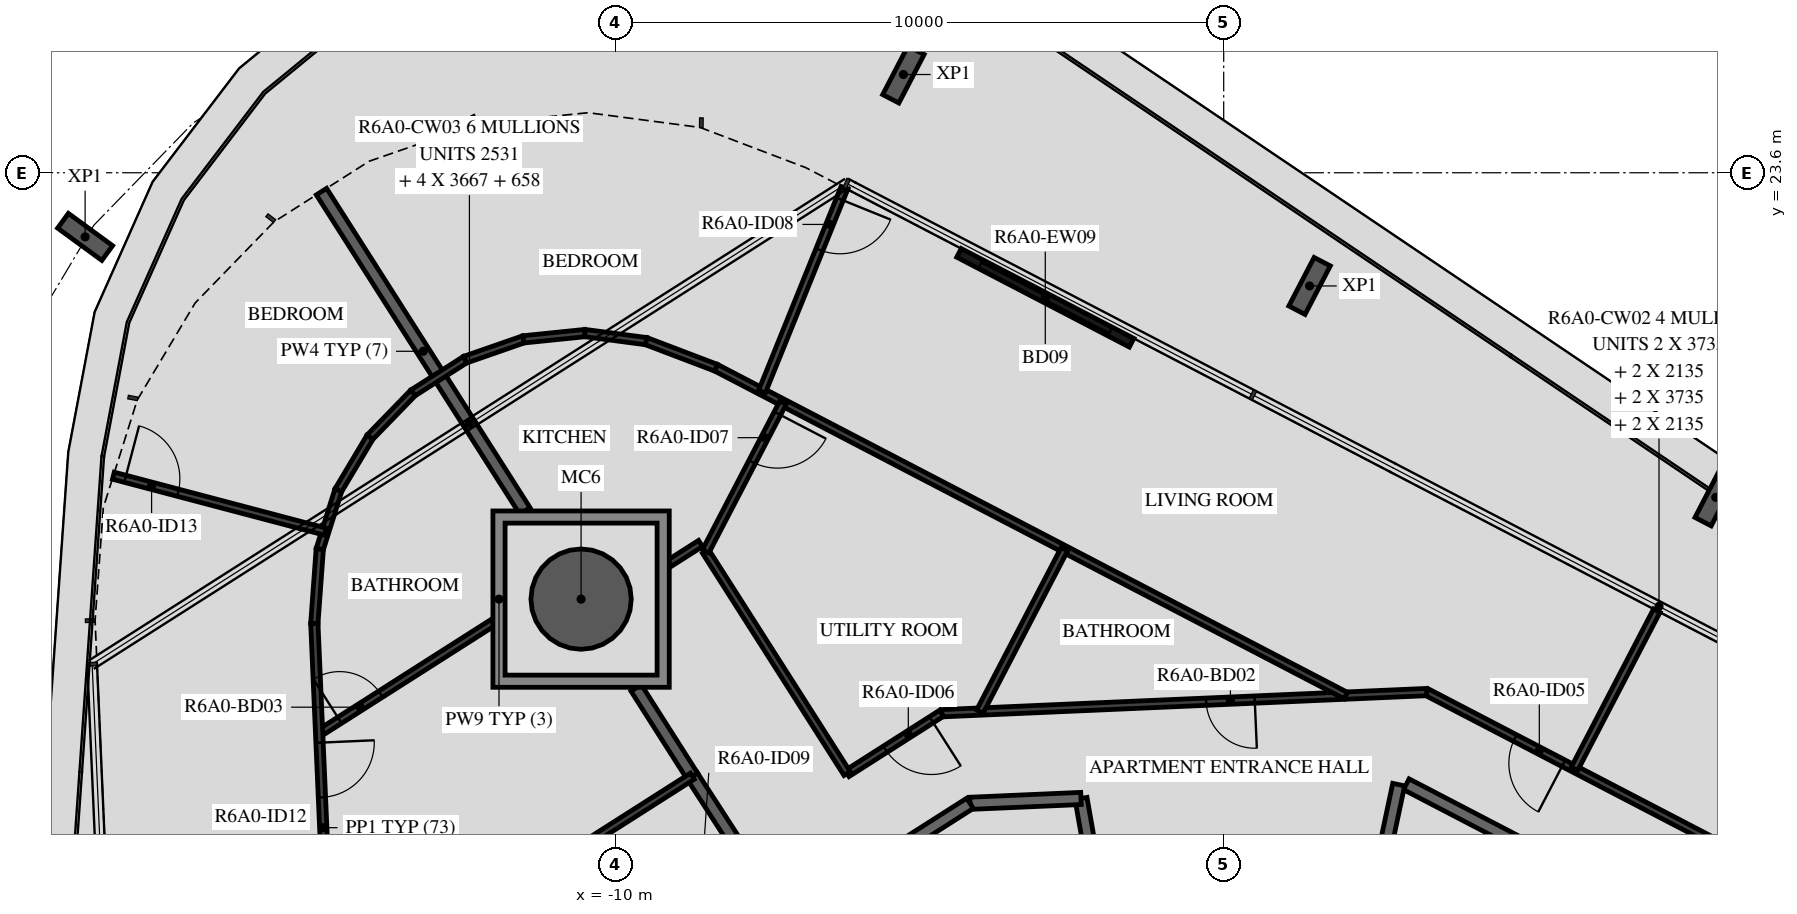
"""IFC4 building model, lengths in metres.
Left out: names, types, materials, properties, quantities, classifications, styles, units other than length and angle.
Written with IfcOpenShell. Run it as: python <this file> out.ifc"""

import sys

from ifc_helpers import new_model, si_unit, direction, frame, frame_2d, origin, origin_2d, place, context, subcontext, project, spatial, polyline, rectangle, hollow_circle, i_section, outline, extrude, element, fill, save


model = new_model("IFC4")
c1 = context("Model", 3, precision=1e-05, world=origin(), true_north=direction((0.0, 1.0)))
c2 = subcontext(c1, "Body", "Model", "MODEL_VIEW")
j1 = project(units=[si_unit("LENGTHUNIT", "METRE"), si_unit("PLANEANGLEUNIT", "RADIAN")], contexts=[c1])
p1 = place(None, origin())
s1 = spatial("IfcSite", under=j1, at=p1, CompositionType="ELEMENT")
p2 = place(p1, origin())
s2 = spatial("IfcBuilding", under=s1, at=p2, CompositionType="ELEMENT")
p3 = place(p2, frame((0.0, 0.0, 226.7)))
s3 = spatial("IfcBuildingStorey", under=s2, at=p3, CompositionType="ELEMENT", Elevation=226.7)
p4 = place(p3, frame((-10.568, 16.588, -0.45), z_axis=(0.0, 0.0, 1.0), x_axis=(1.0, 0.0, 0.0)))
e1 = element("IfcColumn", 1, at=p4, inside=s3, PredefinedType="COLUMN", context=c2, shape_type="SweptSolid", body=[
    extrude(hollow_circle(Radius=0.825, WallThickness=0.04, at=origin_2d()), origin(), (0.0, 0.0, 1.0), 3.57),
])
for number, where, z_axis, x_axis in (
    (2, (8.091, 18.261, -0.45), (0.0, 0.0, 1.0), (0.887, -0.462, 0.0)),
    (3, (1.412, 21.739, -0.45), (0.0, 0.0, 1.0), (0.887, -0.462, 0.0)),
    (4, (-5.267, 25.216, -0.45), (0.0, 0.0, 1.0), (0.887, -0.462, 0.0)),
    (5, (-18.724, 22.545, -0.45), (0.0, 0.0, 1.0), (0.59, 0.808, 0.0)),
):
    element("IfcColumn", number, at=place(p3, frame(where, z_axis=z_axis, x_axis=x_axis)), inside=s3, PredefinedType="COLUMN", context=c2, shape_type="SweptSolid", body=[
        extrude(i_section(OverallWidth=0.3, OverallDepth=0.9, WebThickness=0.019, FlangeThickness=0.035, FilletRadius=0.03, at=origin_2d()), origin(), (0.0, 0.0, 1.0), 3.57),
    ])
p5 = place(p3, frame((-1.515, 20.804, 0.0), z_axis=(0.0, 0.0, 1.0), x_axis=(-0.887014349583, 0.461741858221, 0.0)))
e6 = element("IfcWall", 6, at=p5, inside=s3, PredefinedType="STANDARD", context=c2, shape_type="SweptSolid", body=[
    extrude(rectangle(XDim=3.2, YDim=0.16, at=frame_2d((1.6, 0.0))), origin(), (0.0, 0.0, 1.0), 3.12),
])
p6 = place(p5, frame((0.4, 0.0, 0.0)))
e7 = element("IfcOpeningElement", 7, at=p6, cuts=e6, PredefinedType="OPENING", context=c2, shape_type="SweptSolid", body=[
    extrude(rectangle(XDim=2.4, YDim=2.4, at=frame_2d((1.2, 1.2))), frame((0.0, 0.09, 0.0), z_axis=(0.0, -1.0, 0.0), x_axis=(1.0, 0.0, 0.0)), (0.0, 0.0, 1.0), 0.18),
])
p7 = place(p3, frame((9.372, 10.228, 0.0), z_axis=(0.0, 0.0, 1.0), x_axis=(-0.887005184532, 0.461759464021, 0.0)))
e8 = element("IfcWall", 8, at=p7, inside=s3, PredefinedType="STANDARD", context=c2, shape_type="SweptSolid", body=[
    extrude(rectangle(XDim=7.181, YDim=0.2, at=frame_2d((3.591, 0.0))), origin(), (0.0, 0.0, 1.0), 3.12),
])
p8 = place(p3, frame((2.878, 13.538, 0.0), z_axis=(0.0, 0.0, 1.0), x_axis=(-0.207893604596, -0.978151444904, 0.0)))
e9 = element("IfcWall", 9, at=p8, inside=s3, PredefinedType="STANDARD", context=c2, shape_type="SweptSolid", body=[
    extrude(rectangle(XDim=1.927, YDim=0.2, at=frame_2d((0.963, 0.0))), origin(), (0.0, 0.0, 1.0), 3.12),
])
p9 = place(p3, frame((-2.074, 11.761, 0.0), z_axis=(0.0, 0.0, 1.0), x_axis=(-0.173679082312, 0.984802303189, 0.0)))
e10 = element("IfcWall", 10, at=p9, inside=s3, PredefinedType="STANDARD", context=c2, shape_type="SweptSolid", body=[
    extrude(rectangle(XDim=1.573, YDim=0.2, at=frame_2d((0.787, 0.0))), origin(), (0.0, 0.0, 1.0), 3.12),
])
p10 = place(p3, frame((-2.347, 13.31, 0.0), z_axis=(0.0, 0.0, 1.0), x_axis=(-0.999050095671, -0.043576442492, 0.0)))
e11 = element("IfcWall", 11, at=p10, inside=s3, PredefinedType="STANDARD", context=c2, shape_type="SweptSolid", body=[
    extrude(rectangle(XDim=1.826, YDim=0.2, at=frame_2d((0.913, 0.0))), origin(), (0.0, 0.0, 1.0), 3.12),
])
p11 = place(p3, frame((-4.172, 13.231, 0.0), z_axis=(0.0, 0.0, 1.0), x_axis=(-0.843388394728, -0.537304397561, 0.0)))
e12 = element("IfcWall", 12, at=p11, inside=s3, PredefinedType="STANDARD", context=c2, shape_type="SweptSolid", body=[
    extrude(rectangle(XDim=7.181, YDim=0.2, at=frame_2d((3.59, 0.0))), origin(), (0.0, 0.0, 1.0), 3.12),
])
p12 = place(p3, frame((-8.738, 13.677, 0.0), z_axis=(0.0, 0.0, 1.0), x_axis=(0.54358037296, -0.839357121929, 0.0)))
e13 = element("IfcWall", 13, at=p12, inside=s3, PredefinedType="STANDARD", context=c2, shape_type="SweptSolid", body=[
    extrude(rectangle(XDim=2.83, YDim=0.2, at=frame_2d((1.415, 0.0))), origin(), (0.0, 0.0, 1.0), 3.12),
])
p13 = place(p3, frame((-9.663, 15.129, 0.0), z_axis=(0.0, 0.0, 1.0), x_axis=(0.537205715853, -0.843451254581, 0.0)))
e14 = element("IfcWall", 14, at=p13, inside=s3, PredefinedType="STANDARD", context=c2, shape_type="SweptSolid", body=[
    extrude(rectangle(XDim=1.722, YDim=0.2, at=frame_2d((0.861, 0.0))), origin(), (0.0, 0.0, 1.0), 3.12),
])
p14 = place(p3, frame((-14.837, 23.29, 0.0), z_axis=(0.0, 0.0, 1.0), x_axis=(0.537316863221, -0.843380452998, 0.0)))
e15 = element("IfcWall", 15, at=p14, inside=s3, PredefinedType="STANDARD", context=c2, shape_type="SweptSolid", body=[
    extrude(rectangle(XDim=6.227, YDim=0.2, at=frame_2d((3.113, 0.0))), origin(), (0.0, 0.0, 1.0), 3.12),
])
p15 = place(p3, frame((10.421, 11.373, 0.0), z_axis=(0.0, 0.0, 1.0), x_axis=(-0.887012970857, 0.461744506769, 0.0)))
e16 = element("IfcWall", 16, at=p15, inside=s3, PredefinedType="PARTITIONING", context=c2, shape_type="SweptSolid", body=[
    extrude(rectangle(XDim=7.985, YDim=0.12, at=frame_2d((3.992, 0.0))), origin(), (0.0, 0.0, 1.0), 3.12),
])
p16 = place(p15, frame((5.448, 0.0, 0.0)))
e17 = element("IfcOpeningElement", 17, at=p16, cuts=e16, PredefinedType="OPENING", context=c2, shape_type="SweptSolid", body=[
    extrude(rectangle(XDim=0.9, YDim=2.1, at=frame_2d((0.45, 1.05))), frame((0.0, 0.07, 0.0), z_axis=(0.0, -1.0, 0.0), x_axis=(1.0, 0.0, 0.0)), (0.0, 0.0, 1.0), 0.14),
])
p17 = place(p3, frame((3.339, 15.06, 0.0), z_axis=(0.0, 0.0, 1.0), x_axis=(-0.999047716945, -0.043630943905, 0.0)))
e18 = element("IfcWall", 18, at=p17, inside=s3, PredefinedType="PARTITIONING", context=c2, shape_type="SweptSolid", body=[
    extrude(rectangle(XDim=7.985, YDim=0.12, at=frame_2d((3.992, 0.0))), origin(), (0.0, 0.0, 1.0), 3.12),
])
p18 = place(p17, frame((2.831, 0.0, 0.0)))
e19 = element("IfcOpeningElement", 19, at=p18, cuts=e18, PredefinedType="OPENING", context=c2, shape_type="SweptSolid", body=[
    extrude(rectangle(XDim=0.8, YDim=2.1, at=frame_2d((0.4, 1.05))), frame((0.0, 0.07, 0.0), z_axis=(0.0, -1.0, 0.0), x_axis=(1.0, 0.0, 0.0)), (0.0, 0.0, 1.0), 0.14),
])
p19 = place(p3, frame((-4.639, 14.712, 0.0), z_axis=(0.0, 0.0, 1.0), x_axis=(-0.843361471414, -0.537346655833, 0.0)))
e20 = element("IfcWall", 20, at=p19, inside=s3, PredefinedType="PARTITIONING", context=c2, shape_type="SweptSolid", body=[
    extrude(rectangle(XDim=1.844, YDim=0.12, at=frame_2d((0.922, 0.0))), origin(), (0.0, 0.0, 1.0), 3.12),
])
p20 = place(p19, frame((0.2, 0.0, 0.0)))
e21 = element("IfcOpeningElement", 21, at=p20, cuts=e20, PredefinedType="OPENING", context=c2, shape_type="SweptSolid", body=[
    extrude(rectangle(XDim=0.9, YDim=2.1, at=frame_2d((0.45, 1.05))), frame((0.0, 0.07, 0.0), z_axis=(0.0, -1.0, 0.0), x_axis=(1.0, 0.0, 0.0)), (0.0, 0.0, 1.0), 0.14),
])
p21 = place(p3, frame((-6.194, 13.721, 0.0), z_axis=(0.0, 0.0, 1.0), x_axis=(-0.537316807294, 0.843380488629, 0.0)))
e22 = element("IfcWall", 22, at=p21, inside=s3, PredefinedType="PARTITIONING", context=c2, shape_type="SweptSolid", body=[
    extrude(rectangle(XDim=4.331, YDim=0.12, at=frame_2d((2.165, 0.0))), origin(), (0.0, 0.0, 1.0), 3.12),
])
p22 = place(p3, frame((-8.604, 17.504, 0.0), z_axis=(0.0, 0.0, 1.0), x_axis=(-0.843265746233, -0.537496866251, 0.0)))
e23 = element("IfcWall", 23, at=p22, inside=s3, PredefinedType="PARTITIONING", context=c2, shape_type="SweptSolid", body=[
    extrude(rectangle(XDim=0.61, YDim=0.12, at=frame_2d((0.305, 0.0))), origin(), (0.0, 0.0, 1.0), 3.12),
])
p23 = place(p3, frame((7.122, 16.399, 0.0), z_axis=(0.0, 0.0, 1.0), x_axis=(-0.461763975246, -0.887002836053, 0.0)))
e24 = element("IfcWall", 24, at=p23, inside=s3, PredefinedType="PARTITIONING", context=c2, shape_type="SweptSolid", body=[
    extrude(rectangle(XDim=2.934, YDim=0.12, at=frame_2d((1.467, 0.0))), origin(), (0.0, 0.0, 1.0), 2.73),
])
p24 = place(p3, frame((-8.35, 20.394, 0.0), z_axis=(0.0, 0.0, 1.0), x_axis=(0.887020940825, -0.461729196107, 0.0)))
e25 = element("IfcWall", 25, at=p24, inside=s3, PredefinedType="PARTITIONING", context=c2, shape_type="SweptSolid", body=[
    extrude(rectangle(XDim=11.678, YDim=0.12, at=frame_2d((5.839, 0.0))), origin(), (0.0, 0.0, 1.0), 3.12),
])
p25 = place(p3, frame((-6.237, 23.353, 0.0), z_axis=(0.0, 0.0, 1.0), x_axis=(-0.375089171101, -0.92698873441, 0.0)))
e26 = element("IfcWall", 26, at=p25, inside=s3, PredefinedType="PARTITIONING", context=c2, shape_type="SweptSolid", body=[
    extrude(rectangle(XDim=3.616, YDim=0.12, at=frame_2d((1.808, 0.0))), origin(), (0.0, 0.0, 1.0), 2.73),
])
p26 = place(p25, frame((0.2, 0.0, 0.0)))
e27 = element("IfcOpeningElement", 27, at=p26, cuts=e26, PredefinedType="OPENING", context=c2, shape_type="SweptSolid", body=[
    extrude(rectangle(XDim=0.9, YDim=2.1, at=frame_2d((0.45, 1.05))), frame((0.0, 0.07, 0.0), z_axis=(0.0, -1.0, 0.0), x_axis=(1.0, 0.0, 0.0)), (0.0, 0.0, 1.0), 0.14),
])
p27 = place(p3, frame((-2.619, 17.411, 0.0), z_axis=(0.0, 0.0, 1.0), x_axis=(-0.461743141736, -0.887013681439, 0.0)))
e28 = element("IfcWall", 28, at=p27, inside=s3, PredefinedType="PARTITIONING", context=c2, shape_type="SweptSolid", body=[
    extrude(rectangle(XDim=3.012, YDim=0.12, at=frame_2d((1.506, 0.0))), origin(), (0.0, 0.0, 1.0), 3.12),
])
p28 = place(p3, frame((-7.247, 19.82, 0.0), z_axis=(0.0, 0.0, 1.0), x_axis=(-0.46174004932, -0.887015291218, 0.0)))
e29 = element("IfcWall", 29, at=p28, inside=s3, PredefinedType="PARTITIONING", context=c2, shape_type="SweptSolid", body=[
    extrude(rectangle(XDim=2.759, YDim=0.12, at=frame_2d((1.379, 0.0))), origin(), (0.0, 0.0, 1.0), 3.12),
])
p29 = place(p28, frame((0.2, 0.0, 0.0)))
e30 = element("IfcOpeningElement", 30, at=p29, cuts=e29, PredefinedType="OPENING", context=c2, shape_type="SweptSolid", body=[
    extrude(rectangle(XDim=0.9, YDim=2.1, at=frame_2d((0.45, 1.05))), frame((0.0, 0.07, 0.0), z_axis=(0.0, -1.0, 0.0), x_axis=(1.0, 0.0, 0.0)), (0.0, 0.0, 1.0), 0.14),
])
for number, where, z_axis, x_axis in (
    (31, (-13.332, 19.981, 0.0), (0.0, 0.0, 1.0), (0.843, 0.537, 0.0)),
    (32, (-12.475, 20.527, 0.0), (0.0, 0.0, 1.0), (0.945, 0.328, 0.0)),
):
    element("IfcWall", number, at=place(p3, frame(where, z_axis=z_axis, x_axis=x_axis)), inside=s3, PredefinedType="PARTITIONING", context=c2, shape_type="SweptSolid", body=[
        extrude(rectangle(XDim=1.016, YDim=0.12, at=frame_2d((0.508, 0.0))), origin(), (0.0, 0.0, 1.0), 3.12),
    ])
p30 = place(p3, frame((-11.515, 20.86, 0.0), z_axis=(0.0, 0.0, 1.0), x_axis=(0.994818278641, 0.101669034034, 0.0)))
e33 = element("IfcWall", 33, at=p30, inside=s3, PredefinedType="PARTITIONING", context=c2, shape_type="SweptSolid", body=[
    extrude(rectangle(XDim=1.016, YDim=0.12, at=frame_2d((0.508, 0.0))), origin(), (0.0, 0.0, 1.0), 3.12),
])
p31 = place(p3, frame((-10.504, 20.963, 0.0), z_axis=(0.0, 0.0, 1.0), x_axis=(0.991451023706, -0.13047937612, 0.0)))
e34 = element("IfcWall", 34, at=p31, inside=s3, PredefinedType="PARTITIONING", context=c2, shape_type="SweptSolid", body=[
    extrude(rectangle(XDim=1.016, YDim=0.12, at=frame_2d((0.508, 0.0))), origin(), (0.0, 0.0, 1.0), 3.12),
])
p32 = place(p3, frame((-9.497, 20.831, 0.0), z_axis=(0.0, 0.0, 1.0), x_axis=(0.934575963521, -0.355763641213, 0.0)))
e35 = element("IfcWall", 35, at=p32, inside=s3, PredefinedType="PARTITIONING", context=c2, shape_type="SweptSolid", body=[
    extrude(rectangle(XDim=1.227, YDim=0.12, at=frame_2d((0.614, 0.0))), origin(), (0.0, 0.0, 1.0), 3.12),
])
for number, where, z_axis, x_axis in (
    (36, (-14.865, 17.411, 0.0), (0.0, 0.0, 1.0), (0.301, 0.954, 0.0)),
    (37, (-14.56, 18.38, 0.0), (0.0, 0.0, 1.0), (0.513, 0.859, 0.0)),
    (38, (-14.039, 19.252, 0.0), (0.0, 0.0, 1.0), (0.697, 0.717, 0.0)),
):
    element("IfcWall", number, at=place(p3, frame(where, z_axis=z_axis, x_axis=x_axis)), inside=s3, PredefinedType="PARTITIONING", context=c2, shape_type="SweptSolid", body=[
        extrude(rectangle(XDim=1.016, YDim=0.12, at=frame_2d((0.508, 0.0))), origin(), (0.0, 0.0, 1.0), 3.12),
    ])
p33 = place(p3, frame((-18.26, 18.618, 0.0), z_axis=(0.0, 0.0, 1.0), x_axis=(0.96689176932, -0.25518680691, 0.0)))
e39 = element("IfcWall", 39, at=p33, inside=s3, PredefinedType="PARTITIONING", context=c2, shape_type="SweptSolid", body=[
    extrude(rectangle(XDim=3.604, YDim=0.12, at=frame_2d((1.802, 0.0))), origin(), (0.0, 0.0, 1.0), 3.12),
])
p34 = place(p33, frame((0.2, 0.0, 0.0)))
e40 = element("IfcOpeningElement", 40, at=p34, cuts=e39, PredefinedType="OPENING", context=c2, shape_type="SweptSolid", body=[
    extrude(rectangle(XDim=0.9, YDim=2.1, at=frame_2d((0.45, 1.05))), frame((0.0, 0.07, 0.0), z_axis=(0.0, -1.0, 0.0), x_axis=(1.0, 0.0, 0.0)), (0.0, 0.0, 1.0), 0.14),
])
p35 = place(p3, frame((-14.876, 14.382, 0.0), z_axis=(0.0, 0.0, 1.0), x_axis=(0.843409222082, 0.537271704175, 0.0)))
e41 = element("IfcWall", 41, at=p35, inside=s3, PredefinedType="PARTITIONING", context=c2, shape_type="SweptSolid", body=[
    extrude(rectangle(XDim=3.388, YDim=0.12, at=frame_2d((1.694, 0.0))), origin(), (0.0, 0.0, 1.0), 3.12),
])
p36 = place(p35, frame((0.4, 0.0, 0.0)))
e42 = element("IfcOpeningElement", 42, at=p36, cuts=e41, PredefinedType="OPENING", context=c2, shape_type="SweptSolid", body=[
    extrude(rectangle(XDim=0.8, YDim=2.1, at=frame_2d((0.4, 1.05))), frame((0.0, 0.07, 0.0), z_axis=(0.0, -1.0, 0.0), x_axis=(1.0, 0.0, 0.0)), (0.0, 0.0, 1.0), 0.14),
])
p37 = place(p3, frame((-14.865, 17.411, 0.0), z_axis=(0.0, 0.0, 1.0), x_axis=(-0.072618457011, -0.997359794508, 0.0)))
e43 = element("IfcWall", 43, at=p37, inside=s3, PredefinedType="PARTITIONING", context=c2, shape_type="SweptSolid", body=[
    extrude(rectangle(XDim=1.227, YDim=0.12, at=frame_2d((0.614, 0.0))), origin(), (0.0, 0.0, 1.0), 3.12),
])
p38 = place(p3, frame((-14.955, 16.187, 0.0), z_axis=(0.0, 0.0, 1.0), x_axis=(0.043591713888, -0.999049429448, 0.0)))
e44 = element("IfcWall", 44, at=p38, inside=s3, PredefinedType="PARTITIONING", context=c2, shape_type="SweptSolid", body=[
    extrude(rectangle(XDim=6.721, YDim=0.12, at=frame_2d((3.36, 0.0))), origin(), (0.0, 0.0, 1.0), 3.12),
])
p39 = place(p38, frame((1.961, 0.0, 0.0)))
e45 = element("IfcOpeningElement", 45, at=p39, cuts=e44, PredefinedType="OPENING", context=c2, shape_type="SweptSolid", body=[
    extrude(rectangle(XDim=0.9, YDim=2.1, at=frame_2d((0.45, 1.05))), frame((0.0, 0.07, 0.0), z_axis=(0.0, -1.0, 0.0), x_axis=(1.0, 0.0, 0.0)), (0.0, 0.0, 1.0), 0.14),
])
p40 = place(p3, frame((-14.68, 9.891, 0.0), z_axis=(0.0, 0.0, 1.0), x_axis=(0.843391697183, 0.537299213774, 0.0)))
e46 = element("IfcWall", 46, at=p40, inside=s3, PredefinedType="PARTITIONING", context=c2, shape_type="SweptSolid", body=[
    extrude(rectangle(XDim=7.045, YDim=0.12, at=frame_2d((3.522, 0.0))), origin(), (0.0, 0.0, 1.0), 3.12),
])
p41 = place(p40, frame((0.4, 0.0, 0.0)))
e47 = element("IfcOpeningElement", 47, at=p41, cuts=e46, PredefinedType="OPENING", context=c2, shape_type="SweptSolid", body=[
    extrude(rectangle(XDim=0.9, YDim=2.1, at=frame_2d((0.45, 1.05))), frame((0.0, 0.07, 0.0), z_axis=(0.0, -1.0, 0.0), x_axis=(1.0, 0.0, 0.0)), (0.0, 0.0, 1.0), 0.14),
])
p42 = place(p3, origin())
e48 = element("IfcWall", 48, at=p42, inside=s3, PredefinedType="STANDARD", context=c2, shape_type="SweptSolid", body=[
    extrude(outline(polyline([(-9.118, 18.038), (-9.118, 15.138), (-12.018, 15.138), (-12.018, 18.038), (-9.118, 18.038)]), holes=[polyline([(-11.818, 15.338), (-9.318, 15.338), (-9.318, 17.838), (-11.818, 17.838), (-11.818, 15.338)])]), origin(), (0.0, 0.0, 1.0), 3.12),
])
p43 = place(p6, origin())
e49 = element("IfcDoor", 49, at=p43, inside=s3, OperationType="DOUBLE_DOOR_SLIDING", PredefinedType="DOOR", context=c2, shape_type="SweptSolid", body=[
    extrude(rectangle(XDim=2.4, YDim=2.4, at=frame_2d((1.2, 1.2))), frame((0.0, 0.025, 0.0), z_axis=(0.0, -1.0, 0.0), x_axis=(1.0, 0.0, 0.0)), (0.0, 0.0, 1.0), 0.05),
])
fill(e7, e49)
p44 = place(p16, origin())
e50 = element("IfcDoor", 50, at=p44, inside=s3, OperationType="SINGLE_SWING_RIGHT", PredefinedType="DOOR", context=c2, shape_type="SweptSolid", body=[
    extrude(rectangle(XDim=0.9, YDim=2.1, at=frame_2d((0.45, 1.05))), frame((0.0, 0.025, 0.0), z_axis=(0.0, -1.0, 0.0), x_axis=(1.0, 0.0, 0.0)), (0.0, 0.0, 1.0), 0.05),
])
fill(e17, e50)
p45 = place(p18, origin())
e51 = element("IfcDoor", 51, at=p45, inside=s3, OperationType="SINGLE_SWING_RIGHT", PredefinedType="DOOR", context=c2, shape_type="SweptSolid", body=[
    extrude(rectangle(XDim=0.8, YDim=2.1, at=frame_2d((0.4, 1.05))), frame((0.0, 0.025, 0.0), z_axis=(0.0, -1.0, 0.0), x_axis=(1.0, 0.0, 0.0)), (0.0, 0.0, 1.0), 0.05),
])
fill(e19, e51)
p46 = place(p20, origin())
e52 = element("IfcDoor", 52, at=p46, inside=s3, OperationType="SINGLE_SWING_RIGHT", PredefinedType="DOOR", context=c2, shape_type="SweptSolid", body=[
    extrude(rectangle(XDim=0.9, YDim=2.1, at=frame_2d((0.45, 1.05))), frame((0.0, 0.025, 0.0), z_axis=(0.0, -1.0, 0.0), x_axis=(1.0, 0.0, 0.0)), (0.0, 0.0, 1.0), 0.05),
])
fill(e21, e52)
p47 = place(p29, origin())
e53 = element("IfcDoor", 53, at=p47, inside=s3, OperationType="SINGLE_SWING_RIGHT", PredefinedType="DOOR", context=c2, shape_type="SweptSolid", body=[
    extrude(rectangle(XDim=0.9, YDim=2.1, at=frame_2d((0.45, 1.05))), frame((0.0, 0.025, 0.0), z_axis=(0.0, -1.0, 0.0), x_axis=(1.0, 0.0, 0.0)), (0.0, 0.0, 1.0), 0.05),
])
fill(e30, e53)
p48 = place(p26, origin())
e54 = element("IfcDoor", 54, at=p48, inside=s3, OperationType="SINGLE_SWING_RIGHT", PredefinedType="DOOR", context=c2, shape_type="SweptSolid", body=[
    extrude(rectangle(XDim=0.9, YDim=2.1, at=frame_2d((0.45, 1.05))), frame((0.0, 0.025, 0.0), z_axis=(0.0, -1.0, 0.0), x_axis=(1.0, 0.0, 0.0)), (0.0, 0.0, 1.0), 0.05),
])
fill(e27, e54)
p49 = place(p36, origin())
e55 = element("IfcDoor", 55, at=p49, inside=s3, OperationType="SINGLE_SWING_LEFT", PredefinedType="DOOR", context=c2, shape_type="SweptSolid", body=[
    extrude(rectangle(XDim=0.8, YDim=2.1, at=frame_2d((0.4, 1.05))), frame((0.0, 0.025, 0.0), z_axis=(0.0, -1.0, 0.0), x_axis=(1.0, 0.0, 0.0)), (0.0, 0.0, 1.0), 0.05),
])
fill(e42, e55)
p50 = place(p39, origin())
e56 = element("IfcDoor", 56, at=p50, inside=s3, OperationType="SINGLE_SWING_LEFT", PredefinedType="DOOR", context=c2, shape_type="SweptSolid", body=[
    extrude(rectangle(XDim=0.9, YDim=2.1, at=frame_2d((0.45, 1.05))), frame((0.0, 0.025, 0.0), z_axis=(0.0, -1.0, 0.0), x_axis=(1.0, 0.0, 0.0)), (0.0, 0.0, 1.0), 0.05),
])
fill(e45, e56)
p51 = place(p34, origin())
e57 = element("IfcDoor", 57, at=p51, inside=s3, OperationType="SINGLE_SWING_LEFT", PredefinedType="DOOR", context=c2, shape_type="SweptSolid", body=[
    extrude(rectangle(XDim=0.9, YDim=2.1, at=frame_2d((0.45, 1.05))), frame((0.0, 0.025, 0.0), z_axis=(0.0, -1.0, 0.0), x_axis=(1.0, 0.0, 0.0)), (0.0, 0.0, 1.0), 0.05),
])
fill(e40, e57)
save(model, sys.argv[1])
